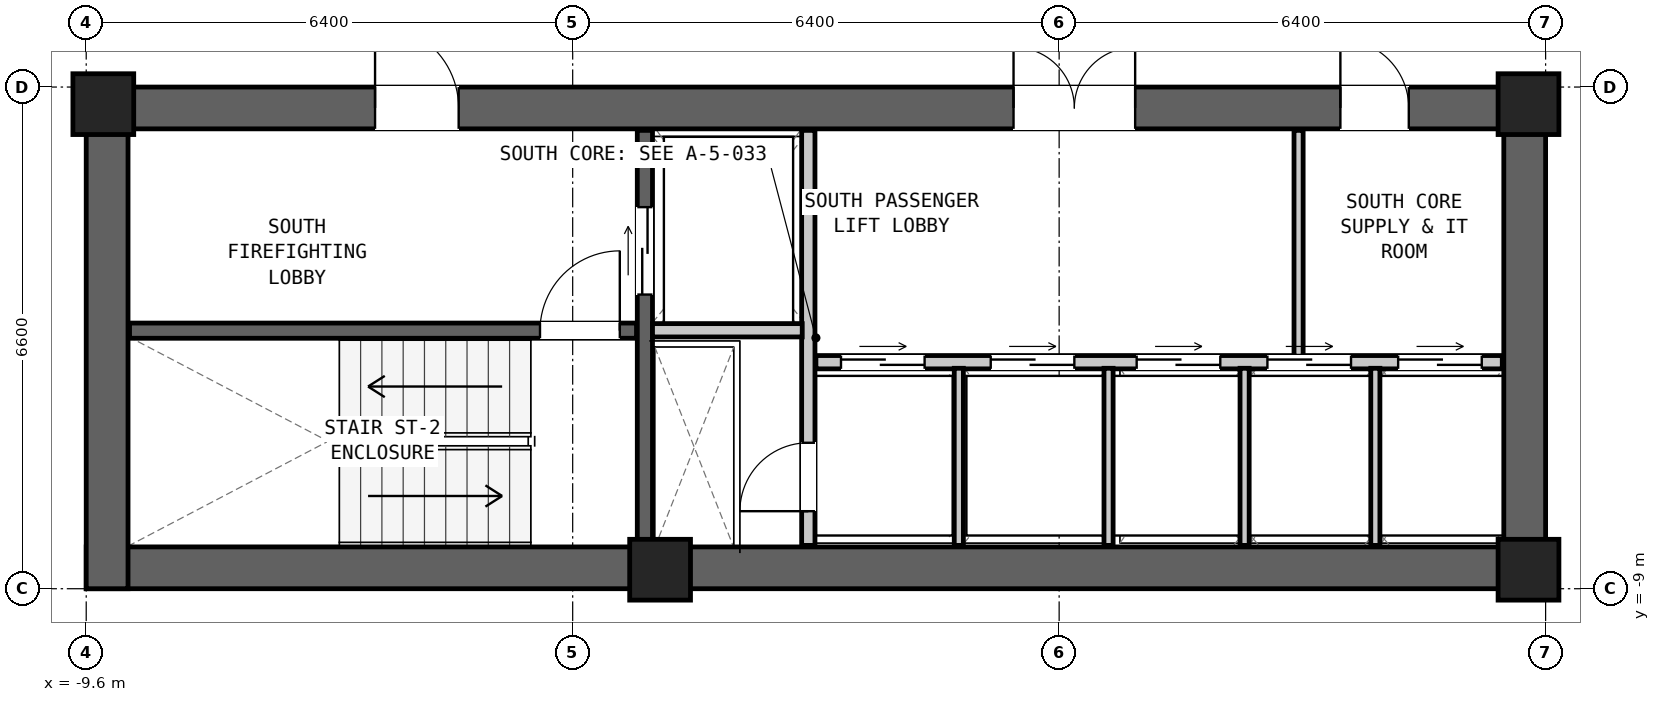
"""IFC4 building model, lengths in metres.
Left out: names, types, materials, properties, quantities, classifications, styles, units other than length and angle.
Written with IfcOpenShell. Run it as: python <this file> out.ifc"""

import sys

from ifc_helpers import new_model, si_unit, direction, frame, frame_2d, origin, origin_2d, place, context, subcontext, project, spatial, rectangle, extrude, element, fill, save


model = new_model("IFC4")
c1 = context("Model", 3, precision=1e-05, world=origin(), true_north=direction((0.0, 1.0)))
c2 = subcontext(c1, "Body", "Model", "MODEL_VIEW")
j1 = project(units=[si_unit("LENGTHUNIT", "METRE"), si_unit("PLANEANGLEUNIT", "RADIAN")], contexts=[c1])
p1 = place(None, origin())
s1 = spatial("IfcSite", under=j1, at=p1, CompositionType="ELEMENT")
p2 = place(p1, origin())
s2 = spatial("IfcBuilding", under=s1, at=p2, CompositionType="ELEMENT")
p3 = place(p2, frame((0.0, 0.0, 104.85)))
s3 = spatial("IfcBuildingStorey", under=s2, at=p3, CompositionType="ELEMENT", Elevation=104.85)
p4 = place(p3, frame((-9.6, -8.725, 0.0), z_axis=(0.0, 0.0, 1.0), x_axis=(1.0, 0.0, 0.0)))
e1 = element("IfcWall", 1, at=p4, inside=s3, PredefinedType="SHEAR", context=c2, shape_type="SweptSolid", body=[
    extrude(rectangle(XDim=19.2, YDim=0.55, at=frame_2d((9.6, 0.0))), origin(), (0.0, 0.0, 1.0), 3.6),
])
p5 = place(p3, frame((-9.6, -2.675, 0.0), z_axis=(0.0, 0.0, 1.0), x_axis=(1.0, 0.0, 0.0)))
e2 = element("IfcWall", 2, at=p5, inside=s3, PredefinedType="SHEAR", context=c2, shape_type="SweptSolid", body=[
    extrude(rectangle(XDim=19.2, YDim=0.55, at=frame_2d((9.6, 0.0))), origin(), (0.0, 0.0, 1.0), 3.6),
])
p6 = place(p5, frame((3.8, 0.0, 0.0)))
e3 = element("IfcOpeningElement", 3, at=p6, cuts=e2, PredefinedType="OPENING", context=c2, shape_type="SweptSolid", body=[
    extrude(rectangle(XDim=1.1, YDim=2.08, at=frame_2d((0.55, 1.04))), frame((0.0, 0.287, 0.0), z_axis=(0.0, -1.0, 0.0), x_axis=(1.0, 0.0, 0.0)), (0.0, 0.0, 1.0), 0.574),
])
p7 = place(p5, frame((12.2, 0.0, 0.0)))
e4 = element("IfcOpeningElement", 4, at=p7, cuts=e2, PredefinedType="OPENING", context=c2, shape_type="SweptSolid", body=[
    extrude(rectangle(XDim=1.6, YDim=2.12, at=frame_2d((0.8, 1.06))), frame((0.0, 0.287, 0.0), z_axis=(0.0, -1.0, 0.0), x_axis=(1.0, 0.0, 0.0)), (0.0, 0.0, 1.0), 0.574),
])
p8 = place(p5, frame((16.5, 0.0, 0.0)))
e5 = element("IfcOpeningElement", 5, at=p8, cuts=e2, PredefinedType="OPENING", context=c2, shape_type="SweptSolid", body=[
    extrude(rectangle(XDim=0.9, YDim=2.05, at=frame_2d((0.45, 1.025))), frame((0.0, 0.287, 0.0), z_axis=(0.0, -1.0, 0.0), x_axis=(1.0, 0.0, 0.0)), (0.0, 0.0, 1.0), 0.574),
])
for number, where, z_axis, x_axis in (
    (6, (-9.325, -9.0, 0.0), (0.0, 0.0, 1.0), (0.0, 1.0, 0.0)),
    (7, (9.325, -9.0, 0.0), (0.0, 0.0, 1.0), (0.0, 1.0, 0.0)),
):
    element("IfcWall", number, at=place(p3, frame(where, z_axis=z_axis, x_axis=x_axis)), inside=s3, PredefinedType="SHEAR", context=c2, shape_type="SweptSolid", body=[
        extrude(rectangle(XDim=6.6, YDim=0.55, at=frame_2d((3.3, 0.0))), origin(), (0.0, 0.0, 1.0), 3.6),
    ])
for number, where, z_axis, x_axis in (
    (8, (-9.375, -2.625, 0.0), (0.0, 0.0, 1.0), (1.0, 0.0, 0.0)),
    (9, (9.375, -2.625, 0.0), (0.0, 0.0, 1.0), (1.0, 0.0, 0.0)),
    (10, (-2.05, -8.75, 0.0), (0.0, 0.0, 1.0), (1.0, 0.0, 0.0)),
    (11, (9.375, -8.75, 0.0), (0.0, 0.0, 1.0), (1.0, 0.0, 0.0)),
):
    element("IfcColumn", number, at=place(p3, frame(where, z_axis=z_axis, x_axis=x_axis)), inside=s3, PredefinedType="COLUMN", context=c2, shape_type="SweptSolid", body=[
        extrude(rectangle(XDim=0.8, YDim=0.8, at=origin_2d()), origin(), (0.0, 0.0, 1.0), 3.6),
    ])
p9 = place(p3, frame((-9.03, -5.605, 0.0), z_axis=(0.0, 0.0, 1.0), x_axis=(1.0, 0.0, 0.0)))
e12 = element("IfcWall", 12, at=p9, inside=s3, PredefinedType="SHEAR", context=c2, shape_type="SweptSolid", body=[
    extrude(rectangle(XDim=6.67, YDim=0.2, at=frame_2d((3.335, 0.0))), origin(), (0.0, 0.0, 1.0), 3.22),
])
p10 = place(p9, frame((5.4, 0.0, 0.0)))
e13 = element("IfcOpeningElement", 13, at=p10, cuts=e12, PredefinedType="OPENING", context=c2, shape_type="SweptSolid", body=[
    extrude(rectangle(XDim=1.05, YDim=2.08, at=frame_2d((0.525, 1.04))), frame((0.0, 0.112, 0.0), z_axis=(0.0, -1.0, 0.0), x_axis=(1.0, 0.0, 0.0)), (0.0, 0.0, 1.0), 0.224),
])
p11 = place(p3, frame((-2.25, -8.43, 0.0), z_axis=(0.0, 0.0, 1.0), x_axis=(0.0, 1.0, 0.0)))
e14 = element("IfcWall", 14, at=p11, inside=s3, PredefinedType="SHEAR", context=c2, shape_type="SweptSolid", body=[
    extrude(rectangle(XDim=5.46, YDim=0.2, at=frame_2d((2.73, 0.0))), origin(), (0.0, 0.0, 1.0), 3.22),
])
p12 = place(p11, frame((3.3, 0.0, 0.0)))
e15 = element("IfcOpeningElement", 15, at=p12, cuts=e14, PredefinedType="OPENING", context=c2, shape_type="SweptSolid", body=[
    extrude(rectangle(XDim=1.15, YDim=2.08, at=frame_2d((0.575, 1.04))), frame((0.0, 0.112, 0.0), z_axis=(0.0, -1.0, 0.0), x_axis=(1.0, 0.0, 0.0)), (0.0, 0.0, 1.0), 0.224),
])
p13 = place(p3, frame((-0.1, -8.43, 0.0), z_axis=(0.0, 0.0, 1.0), x_axis=(0.0, 1.0, 0.0)))
e16 = element("IfcWall", 16, at=p13, inside=s3, PredefinedType="PARTITIONING", context=c2, shape_type="SweptSolid", body=[
    extrude(rectangle(XDim=5.46, YDim=0.175, at=frame_2d((2.73, 0.0))), origin(), (0.0, 0.0, 1.0), 3.22),
])
p14 = place(p13, frame((0.45, 0.0, 0.0)))
e17 = element("IfcOpeningElement", 17, at=p14, cuts=e16, PredefinedType="OPENING", context=c2, shape_type="SweptSolid", body=[
    extrude(rectangle(XDim=0.9, YDim=2.05, at=frame_2d((0.45, 1.025))), frame((0.0, 0.1, 0.0), z_axis=(0.0, -1.0, 0.0), x_axis=(1.0, 0.0, 0.0)), (0.0, 0.0, 1.0), 0.199),
])
p15 = place(p3, frame((-2.15, -5.6, 0.0), z_axis=(0.0, 0.0, 1.0), x_axis=(1.0, 0.0, 0.0)))
e18 = element("IfcWall", 18, at=p15, inside=s3, PredefinedType="PARTITIONING", context=c2, shape_type="SweptSolid", body=[
    extrude(rectangle(XDim=1.97, YDim=0.175, at=frame_2d((0.985, 0.0))), origin(), (0.0, 0.0, 1.0), 3.22),
])
p16 = place(p3, frame((0.0, -6.02, 0.0), z_axis=(0.0, 0.0, 1.0), x_axis=(1.0, 0.0, 0.0)))
e19 = element("IfcWall", 19, at=p16, inside=s3, PredefinedType="PARTITIONING", context=c2, shape_type="SweptSolid", body=[
    extrude(rectangle(XDim=9.03, YDim=0.175, at=frame_2d((4.515, 0.0))), origin(), (0.0, 0.0, 1.0), 3.22),
])
p17 = place(p16, frame((0.33, 0.0, 0.0)))
e20 = element("IfcOpeningElement", 20, at=p17, cuts=e19, PredefinedType="OPENING", context=c2, shape_type="SweptSolid", body=[
    extrude(rectangle(XDim=1.1, YDim=2.06, at=frame_2d((0.55, 1.03))), frame((0.0, 0.1, 0.0), z_axis=(0.0, -1.0, 0.0), x_axis=(1.0, 0.0, 0.0)), (0.0, 0.0, 1.0), 0.199),
])
p18 = place(p16, frame((2.3, 0.0, 0.0)))
e21 = element("IfcOpeningElement", 21, at=p18, cuts=e19, PredefinedType="OPENING", context=c2, shape_type="SweptSolid", body=[
    extrude(rectangle(XDim=1.1, YDim=2.06, at=frame_2d((0.55, 1.03))), frame((0.0, 0.1, 0.0), z_axis=(0.0, -1.0, 0.0), x_axis=(1.0, 0.0, 0.0)), (0.0, 0.0, 1.0), 0.199),
])
p19 = place(p16, frame((4.22, 0.0, 0.0)))
e22 = element("IfcOpeningElement", 22, at=p19, cuts=e19, PredefinedType="OPENING", context=c2, shape_type="SweptSolid", body=[
    extrude(rectangle(XDim=1.1, YDim=2.06, at=frame_2d((0.55, 1.03))), frame((0.0, 0.1, 0.0), z_axis=(0.0, -1.0, 0.0), x_axis=(1.0, 0.0, 0.0)), (0.0, 0.0, 1.0), 0.199),
])
p20 = place(p16, frame((5.94, 0.0, 0.0)))
e23 = element("IfcOpeningElement", 23, at=p20, cuts=e19, PredefinedType="OPENING", context=c2, shape_type="SweptSolid", body=[
    extrude(rectangle(XDim=1.1, YDim=2.06, at=frame_2d((0.55, 1.03))), frame((0.0, 0.1, 0.0), z_axis=(0.0, -1.0, 0.0), x_axis=(1.0, 0.0, 0.0)), (0.0, 0.0, 1.0), 0.199),
])
p21 = place(p16, frame((7.66, 0.0, 0.0)))
e24 = element("IfcOpeningElement", 24, at=p21, cuts=e19, PredefinedType="OPENING", context=c2, shape_type="SweptSolid", body=[
    extrude(rectangle(XDim=1.1, YDim=2.06, at=frame_2d((0.55, 1.03))), frame((0.0, 0.1, 0.0), z_axis=(0.0, -1.0, 0.0), x_axis=(1.0, 0.0, 0.0)), (0.0, 0.0, 1.0), 0.199),
])
for number, where, z_axis, x_axis in (
    (25, (1.88, -8.43, 0.0), (0.0, 0.0, 1.0), (0.0, 1.0, 0.0)),
    (26, (3.85, -8.43, 0.0), (0.0, 0.0, 1.0), (0.0, 1.0, 0.0)),
    (27, (5.64, -8.43, 0.0), (0.0, 0.0, 1.0), (0.0, 1.0, 0.0)),
    (28, (7.36, -8.43, 0.0), (0.0, 0.0, 1.0), (0.0, 1.0, 0.0)),
):
    element("IfcWall", number, at=place(p3, frame(where, z_axis=z_axis, x_axis=x_axis)), inside=s3, PredefinedType="PARTITIONING", context=c2, shape_type="SweptSolid", body=[
        extrude(rectangle(XDim=2.33, YDim=0.12, at=frame_2d((1.165, 0.0))), origin(), (0.0, 0.0, 1.0), 3.22),
    ])
p22 = place(p3, frame((6.35, -5.94, 0.0), z_axis=(0.0, 0.0, 1.0), x_axis=(0.0, 1.0, 0.0)))
e29 = element("IfcWall", 29, at=p22, inside=s3, PredefinedType="PARTITIONING", context=c2, shape_type="SweptSolid", body=[
    extrude(rectangle(XDim=2.97, YDim=0.12, at=frame_2d((1.485, 0.0))), origin(), (0.0, 0.0, 1.0), 3.22),
])
p23 = place(p10, origin())
e30 = element("IfcDoor", 30, at=p23, inside=s3, OperationType="SINGLE_SWING_RIGHT", PredefinedType="DOOR", context=c2, shape_type="SweptSolid", body=[
    extrude(rectangle(XDim=1.05, YDim=2.08, at=frame_2d((0.525, 1.04))), frame((0.0, 0.025, 0.0), z_axis=(0.0, -1.0, 0.0), x_axis=(1.0, 0.0, 0.0)), (0.0, 0.0, 1.0), 0.05),
])
fill(e13, e30)
p24 = place(p6, origin())
e31 = element("IfcDoor", 31, at=p24, inside=s3, OperationType="SINGLE_SWING_LEFT", PredefinedType="DOOR", context=c2, shape_type="SweptSolid", body=[
    extrude(rectangle(XDim=1.1, YDim=2.08, at=frame_2d((0.55, 1.04))), frame((0.0, 0.025, 0.0), z_axis=(0.0, -1.0, 0.0), x_axis=(1.0, 0.0, 0.0)), (0.0, 0.0, 1.0), 0.05),
])
fill(e3, e31)
p25 = place(p12, origin())
e32 = element("IfcDoor", 32, at=p25, inside=s3, OperationType="DOUBLE_DOOR_SLIDING", PredefinedType="DOOR", context=c2, shape_type="SweptSolid", body=[
    extrude(rectangle(XDim=1.15, YDim=2.08, at=frame_2d((0.575, 1.04))), frame((0.0, 0.025, 0.0), z_axis=(0.0, -1.0, 0.0), x_axis=(1.0, 0.0, 0.0)), (0.0, 0.0, 1.0), 0.05),
])
fill(e15, e32)
p26 = place(p14, origin())
e33 = element("IfcDoor", 33, at=p26, inside=s3, OperationType="SINGLE_SWING_LEFT", PredefinedType="DOOR", context=c2, shape_type="SweptSolid", body=[
    extrude(rectangle(XDim=0.9, YDim=2.05, at=frame_2d((0.45, 1.025))), frame((0.0, 0.025, 0.0), z_axis=(0.0, -1.0, 0.0), x_axis=(1.0, 0.0, 0.0)), (0.0, 0.0, 1.0), 0.05),
])
fill(e17, e33)
p27 = place(p17, origin())
e34 = element("IfcDoor", 34, at=p27, inside=s3, OperationType="DOUBLE_DOOR_SLIDING", PredefinedType="DOOR", context=c2, shape_type="SweptSolid", body=[
    extrude(rectangle(XDim=1.1, YDim=2.06, at=frame_2d((0.55, 1.03))), frame((0.0, 0.025, 0.0), z_axis=(0.0, -1.0, 0.0), x_axis=(1.0, 0.0, 0.0)), (0.0, 0.0, 1.0), 0.05),
])
fill(e20, e34)
p28 = place(p18, origin())
e35 = element("IfcDoor", 35, at=p28, inside=s3, OperationType="DOUBLE_DOOR_SLIDING", PredefinedType="DOOR", context=c2, shape_type="SweptSolid", body=[
    extrude(rectangle(XDim=1.1, YDim=2.06, at=frame_2d((0.55, 1.03))), frame((0.0, 0.025, 0.0), z_axis=(0.0, -1.0, 0.0), x_axis=(1.0, 0.0, 0.0)), (0.0, 0.0, 1.0), 0.05),
])
fill(e21, e35)
p29 = place(p19, origin())
e36 = element("IfcDoor", 36, at=p29, inside=s3, OperationType="DOUBLE_DOOR_SLIDING", PredefinedType="DOOR", context=c2, shape_type="SweptSolid", body=[
    extrude(rectangle(XDim=1.1, YDim=2.06, at=frame_2d((0.55, 1.03))), frame((0.0, 0.025, 0.0), z_axis=(0.0, -1.0, 0.0), x_axis=(1.0, 0.0, 0.0)), (0.0, 0.0, 1.0), 0.05),
])
fill(e22, e36)
p30 = place(p20, origin())
e37 = element("IfcDoor", 37, at=p30, inside=s3, OperationType="DOUBLE_DOOR_SLIDING", PredefinedType="DOOR", context=c2, shape_type="SweptSolid", body=[
    extrude(rectangle(XDim=1.1, YDim=2.06, at=frame_2d((0.55, 1.03))), frame((0.0, 0.025, 0.0), z_axis=(0.0, -1.0, 0.0), x_axis=(1.0, 0.0, 0.0)), (0.0, 0.0, 1.0), 0.05),
])
fill(e23, e37)
p31 = place(p21, origin())
e38 = element("IfcDoor", 38, at=p31, inside=s3, OperationType="DOUBLE_DOOR_SLIDING", PredefinedType="DOOR", context=c2, shape_type="SweptSolid", body=[
    extrude(rectangle(XDim=1.1, YDim=2.06, at=frame_2d((0.55, 1.03))), frame((0.0, 0.025, 0.0), z_axis=(0.0, -1.0, 0.0), x_axis=(1.0, 0.0, 0.0)), (0.0, 0.0, 1.0), 0.05),
])
fill(e24, e38)
p32 = place(p7, origin())
e39 = element("IfcDoor", 39, at=p32, inside=s3, OperationType="DOUBLE_DOOR_SINGLE_SWING", PredefinedType="DOOR", context=c2, shape_type="SweptSolid", body=[
    extrude(rectangle(XDim=1.6, YDim=2.12, at=frame_2d((0.8, 1.06))), frame((0.0, 0.025, 0.0), z_axis=(0.0, -1.0, 0.0), x_axis=(1.0, 0.0, 0.0)), (0.0, 0.0, 1.0), 0.05),
])
fill(e4, e39)
p33 = place(p8, origin())
e40 = element("IfcDoor", 40, at=p33, inside=s3, OperationType="SINGLE_SWING_LEFT", PredefinedType="DOOR", context=c2, shape_type="SweptSolid", body=[
    extrude(rectangle(XDim=0.9, YDim=2.05, at=frame_2d((0.45, 1.025))), frame((0.0, 0.025, 0.0), z_axis=(0.0, -1.0, 0.0), x_axis=(1.0, 0.0, 0.0)), (0.0, 0.0, 1.0), 0.05),
])
fill(e5, e40)
save(model, sys.argv[1])
